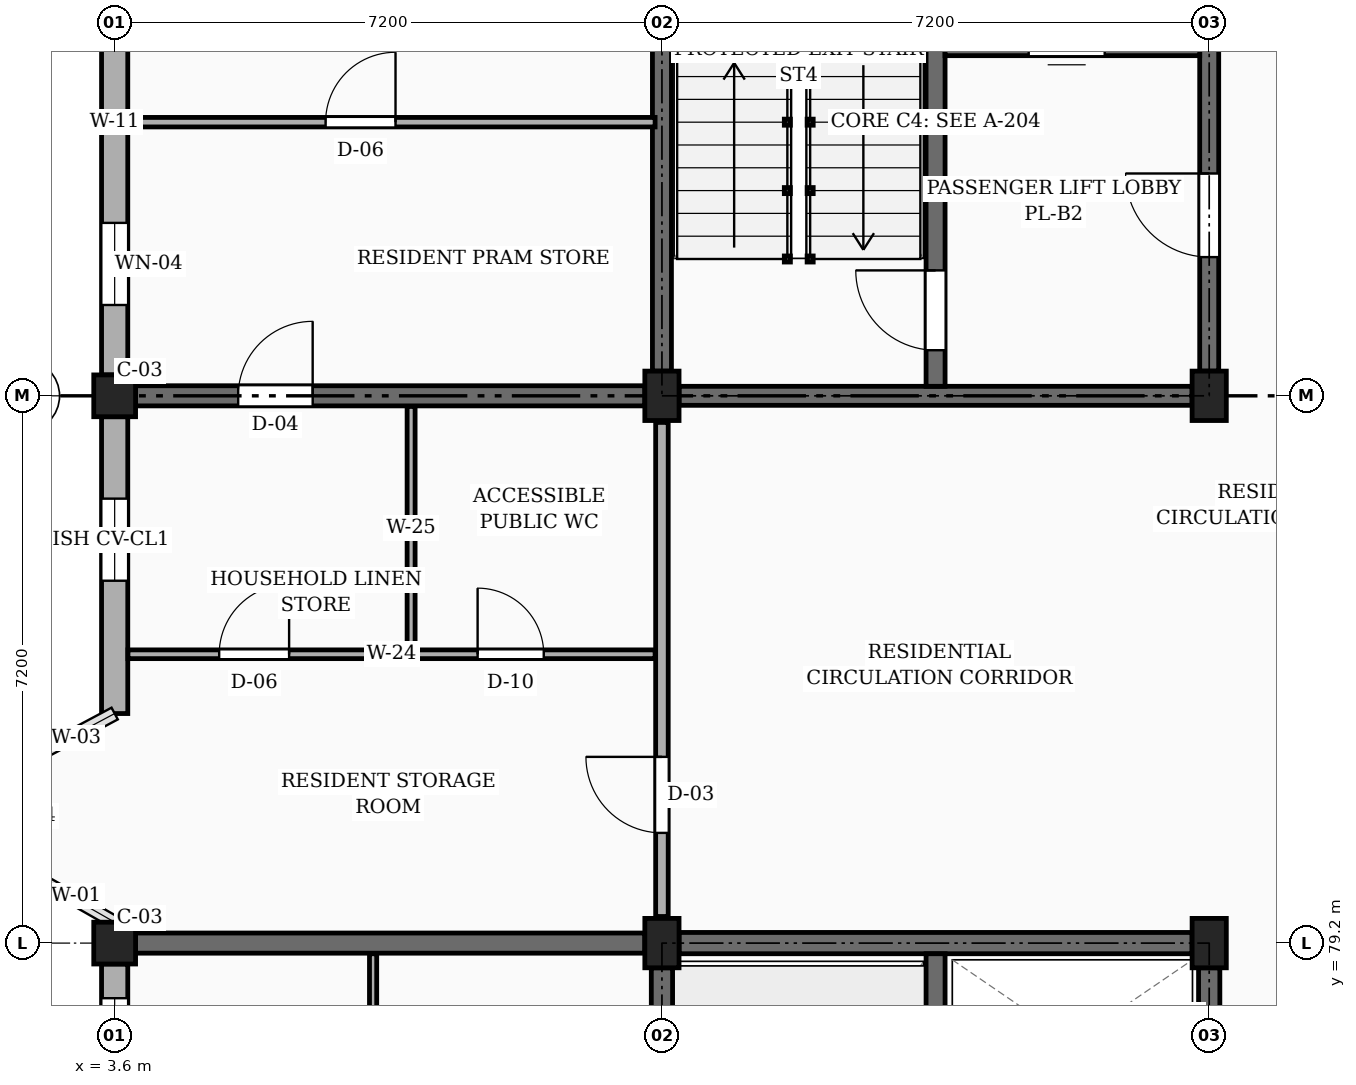
"""IFC4 building model, lengths in metres.
Left out: names, types, materials, properties, quantities, classifications, styles, units other than length and angle.
Written with IfcOpenShell. Run it as: python <this file> out.ifc"""

import sys

from ifc_helpers import new_model, si_unit, direction, frame, frame_2d, origin, origin_2d, place, context, subcontext, project, spatial, rectangle, extrude, element, fill, save


model = new_model("IFC4")
c1 = context("Model", 3, precision=1e-05, world=origin(), true_north=direction((0.0, 1.0)))
c2 = subcontext(c1, "Body", "Model", "MODEL_VIEW")
j1 = project(units=[si_unit("LENGTHUNIT", "METRE"), si_unit("PLANEANGLEUNIT", "RADIAN")], contexts=[c1])
p1 = place(None, origin())
s1 = spatial("IfcSite", under=j1, at=p1, CompositionType="ELEMENT")
p2 = place(p1, origin())
s2 = spatial("IfcBuilding", under=s1, at=p2, CompositionType="ELEMENT")
p3 = place(p2, frame((0.0, 0.0, 10.8)))
s3 = spatial("IfcBuildingStorey", under=s2, at=p3, CompositionType="ELEMENT", Elevation=10.8)
for number, where, z_axis, x_axis in (
    (1, (3.6, 79.2, 0.0), (0.0, 0.0, 1.0), (1.0, 0.0, 0.0)),
    (2, (3.6, 86.4, 0.0), (0.0, 0.0, 1.0), (1.0, 0.0, 0.0)),
):
    element("IfcColumn", number, at=place(p3, frame(where, z_axis=z_axis, x_axis=x_axis)), inside=s3, PredefinedType="COLUMN", context=c2, shape_type="SweptSolid", body=[
        extrude(rectangle(XDim=0.55, YDim=0.55, at=origin_2d()), origin(), (0.0, 0.0, 1.0), 3.15),
    ])
for number, where, z_axis, x_axis in (
    (3, (10.8, 79.2, 0.0), (0.0, 0.0, 1.0), (1.0, 0.0, 0.0)),
    (4, (10.8, 86.4, 0.0), (0.0, 0.0, 1.0), (1.0, 0.0, 0.0)),
    (5, (18.0, 79.2, 0.0), (0.0, 0.0, 1.0), (1.0, 0.0, 0.0)),
    (6, (18.0, 86.4, 0.0), (0.0, 0.0, 1.0), (1.0, 0.0, 0.0)),
):
    element("IfcColumn", number, at=place(p3, frame(where, z_axis=z_axis, x_axis=x_axis)), inside=s3, PredefinedType="COLUMN", context=c2, shape_type="SweptSolid", body=[
        extrude(rectangle(XDim=0.45, YDim=0.65, at=origin_2d()), origin(), (0.0, 0.0, 1.0), 3.15),
    ])
p4 = place(p3, frame((3.875, 79.2, 0.0), z_axis=(0.0, 0.0, 1.0), x_axis=(1.0, 0.0, 0.0)))
e7 = element("IfcWall", 7, at=p4, inside=s3, PredefinedType="SOLIDWALL", context=c2, shape_type="SweptSolid", body=[
    extrude(rectangle(XDim=6.7, YDim=0.265, at=frame_2d((3.35, 0.0))), origin(), (0.0, 0.0, 1.0), 2.21),
])
p5 = place(p3, frame((3.875, 86.4, 0.0), z_axis=(0.0, 0.0, 1.0), x_axis=(1.0, 0.0, 0.0)))
e8 = element("IfcWall", 8, at=p5, inside=s3, PredefinedType="SOLIDWALL", context=c2, shape_type="SweptSolid", body=[
    extrude(rectangle(XDim=6.7, YDim=0.265, at=frame_2d((3.35, 0.0))), origin(), (0.0, 0.0, 1.0), 2.21),
])
p6 = place(p5, frame((1.35, 0.0, 0.0)))
e9 = element("IfcOpeningElement", 9, at=p6, cuts=e8, PredefinedType="OPENING", context=c2, shape_type="SweptSolid", body=[
    extrude(rectangle(XDim=0.98, YDim=2.12, at=frame_2d((0.49, 1.06))), frame((0.0, 0.143, 0.0), z_axis=(0.0, -1.0, 0.0), x_axis=(1.0, 0.0, 0.0)), (0.0, 0.0, 1.0), 0.285),
])
p7 = place(p3, frame((3.6, 93.325, 0.0), z_axis=(0.0, 0.0, 1.0), x_axis=(0.0, -1.0, 0.0)))
e10 = element("IfcWall", 10, at=p7, inside=s3, PredefinedType="SOLIDWALL", context=c2, shape_type="SweptSolid", body=[
    extrude(rectangle(XDim=6.65, YDim=0.345, at=frame_2d((3.325, 0.0))), origin(), (0.0, 0.0, 1.0), 2.48),
])
p8 = place(p7, frame((0.45, 0.0, 0.78)))
e11 = element("IfcOpeningElement", 11, at=p8, cuts=e10, PredefinedType="OPENING", context=c2, shape_type="SweptSolid", body=[
    extrude(rectangle(XDim=0.92, YDim=1.15, at=frame_2d((0.46, 0.575))), frame((0.0, 0.183, 0.0), z_axis=(0.0, -1.0, 0.0), x_axis=(1.0, 0.0, 0.0)), (0.0, 0.0, 1.0), 0.365),
])
p9 = place(p7, frame((4.65, 0.0, 0.78)))
e12 = element("IfcOpeningElement", 12, at=p9, cuts=e10, PredefinedType="OPENING", context=c2, shape_type="SweptSolid", body=[
    extrude(rectangle(XDim=1.08, YDim=1.15, at=frame_2d((0.54, 0.575))), frame((0.0, 0.183, 0.0), z_axis=(0.0, -1.0, 0.0), x_axis=(1.0, 0.0, 0.0)), (0.0, 0.0, 1.0), 0.365),
])
p10 = place(p3, frame((3.6, 86.125, 0.0), z_axis=(0.0, 0.0, 1.0), x_axis=(0.0, -1.0, 0.0)))
e13 = element("IfcWall", 13, at=p10, inside=s3, PredefinedType="SOLIDWALL", context=c2, shape_type="SweptSolid", body=[
    extrude(rectangle(XDim=3.905, YDim=0.345, at=frame_2d((1.953, 0.0))), origin(), (0.0, 0.0, 1.0), 2.48),
])
p11 = place(p10, frame((1.077, 0.0, 0.78)))
e14 = element("IfcOpeningElement", 14, at=p11, cuts=e13, PredefinedType="OPENING", context=c2, shape_type="SweptSolid", body=[
    extrude(rectangle(XDim=1.08, YDim=1.15, at=frame_2d((0.54, 0.575))), frame((0.0, 0.183, 0.0), z_axis=(0.0, -1.0, 0.0), x_axis=(1.0, 0.0, 0.0)), (0.0, 0.0, 1.0), 0.365),
])
p12 = place(p3, frame((3.6, 78.925, 0.0), z_axis=(0.0, 0.0, 1.0), x_axis=(0.0, -1.0, 0.0)))
e15 = element("IfcWall", 15, at=p12, inside=s3, PredefinedType="SOLIDWALL", context=c2, shape_type="SweptSolid", body=[
    extrude(rectangle(XDim=6.65, YDim=0.345, at=frame_2d((3.325, 0.0))), origin(), (0.0, 0.0, 1.0), 2.48),
])
p13 = place(p12, frame((0.45, 0.0, 0.78)))
e16 = element("IfcOpeningElement", 16, at=p13, cuts=e15, PredefinedType="OPENING", context=c2, shape_type="SweptSolid", body=[
    extrude(rectangle(XDim=1.16, YDim=1.15, at=frame_2d((0.58, 0.575))), frame((0.0, 0.183, 0.0), z_axis=(0.0, -1.0, 0.0), x_axis=(1.0, 0.0, 0.0)), (0.0, 0.0, 1.0), 0.365),
])
p14 = place(p12, frame((4.65, 0.0, 0.78)))
e17 = element("IfcOpeningElement", 17, at=p14, cuts=e15, PredefinedType="OPENING", context=c2, shape_type="SweptSolid", body=[
    extrude(rectangle(XDim=1.32, YDim=1.15, at=frame_2d((0.66, 0.575))), frame((0.0, 0.183, 0.0), z_axis=(0.0, -1.0, 0.0), x_axis=(1.0, 0.0, 0.0)), (0.0, 0.0, 1.0), 0.365),
])
p15 = place(p3, frame((10.8, 72.325, 0.0), z_axis=(0.0, 0.0, 1.0), x_axis=(0.0, 1.0, 0.0)))
e18 = element("IfcWall", 18, at=p15, inside=s3, PredefinedType="SHEAR", context=c2, shape_type="SweptSolid", body=[
    extrude(rectangle(XDim=6.55, YDim=0.28, at=frame_2d((3.275, 0.0))), origin(), (0.0, 0.0, 1.0), 2.91),
])
p16 = place(p3, frame((11.025, 79.2, 0.0), z_axis=(0.0, 0.0, 1.0), x_axis=(1.0, 0.0, 0.0)))
e19 = element("IfcWall", 19, at=p16, inside=s3, PredefinedType="SHEAR", context=c2, shape_type="SweptSolid", body=[
    extrude(rectangle(XDim=6.75, YDim=0.28, at=frame_2d((3.375, 0.0))), origin(), (0.0, 0.0, 1.0), 2.91),
])
p17 = place(p3, frame((18.0, 72.325, 0.0), z_axis=(0.0, 0.0, 1.0), x_axis=(0.0, 1.0, 0.0)))
e20 = element("IfcWall", 20, at=p17, inside=s3, PredefinedType="SHEAR", context=c2, shape_type="SweptSolid", body=[
    extrude(rectangle(XDim=6.55, YDim=0.28, at=frame_2d((3.275, 0.0))), origin(), (0.0, 0.0, 1.0), 2.91),
])
p18 = place(p17, frame((1.5, 0.0, 0.0)))
e21 = element("IfcOpeningElement", 21, at=p18, cuts=e20, PredefinedType="OPENING", context=c2, shape_type="SweptSolid", body=[
    extrude(rectangle(XDim=1.1, YDim=2.15, at=frame_2d((0.55, 1.075))), frame((0.0, 0.15, 0.0), z_axis=(0.0, -1.0, 0.0), x_axis=(1.0, 0.0, 0.0)), (0.0, 0.0, 1.0), 0.3),
])
p19 = place(p3, frame((14.4, 72.14, 0.0), z_axis=(0.0, 0.0, 1.0), x_axis=(0.0, 1.0, 0.0)))
e22 = element("IfcWall", 22, at=p19, inside=s3, PredefinedType="SHEAR", context=c2, shape_type="SweptSolid", body=[
    extrude(rectangle(XDim=6.92, YDim=0.25, at=frame_2d((3.46, 0.0))), origin(), (0.0, 0.0, 1.0), 2.91),
])
p20 = place(p19, frame((0.46, 0.0, 0.0)))
e23 = element("IfcOpeningElement", 23, at=p20, cuts=e22, PredefinedType="OPENING", context=c2, shape_type="SweptSolid", body=[
    extrude(rectangle(XDim=1.05, YDim=2.15, at=frame_2d((0.525, 1.075))), frame((0.0, 0.135, 0.0), z_axis=(0.0, -1.0, 0.0), x_axis=(1.0, 0.0, 0.0)), (0.0, 0.0, 1.0), 0.27),
])
p21 = place(p3, frame((10.8, 86.725, 0.0), z_axis=(0.0, 0.0, 1.0), x_axis=(0.0, 1.0, 0.0)))
e24 = element("IfcWall", 24, at=p21, inside=s3, PredefinedType="SHEAR", context=c2, shape_type="SweptSolid", body=[
    extrude(rectangle(XDim=6.55, YDim=0.25, at=frame_2d((3.275, 0.0))), origin(), (0.0, 0.0, 1.0), 2.91),
])
p22 = place(p3, frame((18.0, 86.725, 0.0), z_axis=(0.0, 0.0, 1.0), x_axis=(0.0, 1.0, 0.0)))
e25 = element("IfcWall", 25, at=p22, inside=s3, PredefinedType="SHEAR", context=c2, shape_type="SweptSolid", body=[
    extrude(rectangle(XDim=6.55, YDim=0.25, at=frame_2d((3.275, 0.0))), origin(), (0.0, 0.0, 1.0), 2.91),
])
p23 = place(p22, frame((1.5, 0.0, 0.0)))
e26 = element("IfcOpeningElement", 26, at=p23, cuts=e25, PredefinedType="OPENING", context=c2, shape_type="SweptSolid", body=[
    extrude(rectangle(XDim=1.1, YDim=2.15, at=frame_2d((0.55, 1.075))), frame((0.0, 0.135, 0.0), z_axis=(0.0, -1.0, 0.0), x_axis=(1.0, 0.0, 0.0)), (0.0, 0.0, 1.0), 0.27),
])
p24 = place(p3, frame((11.025, 86.4, 0.0), z_axis=(0.0, 0.0, 1.0), x_axis=(1.0, 0.0, 0.0)))
e27 = element("IfcWall", 27, at=p24, inside=s3, PredefinedType="SHEAR", context=c2, shape_type="SweptSolid", body=[
    extrude(rectangle(XDim=6.75, YDim=0.25, at=frame_2d((3.375, 0.0))), origin(), (0.0, 0.0, 1.0), 2.91),
])
p25 = place(p3, frame((14.4, 86.525, 0.0), z_axis=(0.0, 0.0, 1.0), x_axis=(0.0, 1.0, 0.0)))
e28 = element("IfcWall", 28, at=p25, inside=s3, PredefinedType="SHEAR", context=c2, shape_type="SweptSolid", body=[
    extrude(rectangle(XDim=6.95, YDim=0.25, at=frame_2d((3.475, 0.0))), origin(), (0.0, 0.0, 1.0), 2.91),
])
p26 = place(p25, frame((0.475, 0.0, 0.0)))
e29 = element("IfcOpeningElement", 29, at=p26, cuts=e28, PredefinedType="OPENING", context=c2, shape_type="SweptSolid", body=[
    extrude(rectangle(XDim=1.05, YDim=2.15, at=frame_2d((0.525, 1.075))), frame((0.0, 0.135, 0.0), z_axis=(0.0, -1.0, 0.0), x_axis=(1.0, 0.0, 0.0)), (0.0, 0.0, 1.0), 0.27),
])
p27 = place(p3, frame((14.525, 91.0, 0.0), z_axis=(0.0, 0.0, 1.0), x_axis=(1.0, 0.0, 0.0)))
e30 = element("IfcWall", 30, at=p27, inside=s3, PredefinedType="SHEAR", context=c2, shape_type="SweptSolid", body=[
    extrude(rectangle(XDim=3.35, YDim=0.25, at=frame_2d((1.675, 0.0))), origin(), (0.0, 0.0, 1.0), 2.91),
])
p28 = place(p27, frame((1.1, 0.0, 0.0)))
e31 = element("IfcOpeningElement", 31, at=p28, cuts=e30, PredefinedType="OPENING", context=c2, shape_type="SweptSolid", body=[
    extrude(rectangle(XDim=1.0, YDim=2.2, at=frame_2d((0.5, 1.1))), frame((0.0, 0.135, 0.0), z_axis=(0.0, -1.0, 0.0), x_axis=(1.0, 0.0, 0.0)), (0.0, 0.0, 1.0), 0.27),
])
p29 = place(p3, frame((10.8, 79.55, 0.0), z_axis=(0.0, 0.0, 1.0), x_axis=(0.0, 1.0, 0.0)))
e32 = element("IfcWall", 32, at=p29, inside=s3, PredefinedType="PARTITIONING", context=c2, shape_type="SweptSolid", body=[
    extrude(rectangle(XDim=6.5, YDim=0.165, at=frame_2d((3.25, 0.0))), origin(), (0.0, 0.0, 1.0), 2.26),
])
p30 = place(p29, frame((1.1, 0.0, 0.0)))
e33 = element("IfcOpeningElement", 33, at=p30, cuts=e32, PredefinedType="OPENING", context=c2, shape_type="SweptSolid", body=[
    extrude(rectangle(XDim=1.0, YDim=2.15, at=frame_2d((0.5, 1.075))), frame((0.0, 0.093, 0.0), z_axis=(0.0, -1.0, 0.0), x_axis=(1.0, 0.0, 0.0)), (0.0, 0.0, 1.0), 0.185),
])
p31 = place(p3, frame((7.0, 75.37, 0.0), z_axis=(0.0, 0.0, 1.0), x_axis=(0.0, 1.0, 0.0)))
e34 = element("IfcWall", 34, at=p31, inside=s3, PredefinedType="PARTITIONING", context=c2, shape_type="SweptSolid", body=[
    extrude(rectangle(XDim=3.69, YDim=0.095, at=frame_2d((1.845, 0.0))), origin(), (0.0, 0.0, 1.0), 2.345),
])
p32 = place(p3, frame((3.775, 83.0, 0.0), z_axis=(0.0, 0.0, 1.0), x_axis=(1.0, 0.0, 0.0)))
e35 = element("IfcWall", 35, at=p32, inside=s3, PredefinedType="PARTITIONING", context=c2, shape_type="SweptSolid", body=[
    extrude(rectangle(XDim=6.935, YDim=0.115, at=frame_2d((3.468, 0.0))), origin(), (0.0, 0.0, 1.0), 2.345),
])
p33 = place(p32, frame((4.6, 0.0, 0.0)))
e36 = element("IfcOpeningElement", 36, at=p33, cuts=e35, PredefinedType="OPENING", context=c2, shape_type="SweptSolid", body=[
    extrude(rectangle(XDim=0.87, YDim=2.05, at=frame_2d((0.435, 1.025))), frame((0.0, 0.067, 0.0), z_axis=(0.0, -1.0, 0.0), x_axis=(1.0, 0.0, 0.0)), (0.0, 0.0, 1.0), 0.135),
])
p34 = place(p32, frame((1.2, 0.0, 0.0)))
e37 = element("IfcOpeningElement", 37, at=p34, cuts=e35, PredefinedType="OPENING", context=c2, shape_type="SweptSolid", body=[
    extrude(rectangle(XDim=0.92, YDim=2.1, at=frame_2d((0.46, 1.05))), frame((0.0, 0.067, 0.0), z_axis=(0.0, -1.0, 0.0), x_axis=(1.0, 0.0, 0.0)), (0.0, 0.0, 1.0), 0.135),
])
p35 = place(p3, frame((7.5, 83.07, 0.0), z_axis=(0.0, 0.0, 1.0), x_axis=(0.0, 1.0, 0.0)))
e38 = element("IfcWall", 38, at=p35, inside=s3, PredefinedType="PARTITIONING", context=c2, shape_type="SweptSolid", body=[
    extrude(rectangle(XDim=3.19, YDim=0.105, at=frame_2d((1.595, 0.0))), origin(), (0.0, 0.0, 1.0), 2.345),
])
p36 = place(p3, frame((3.775, 90.0, 0.0), z_axis=(0.0, 0.0, 1.0), x_axis=(1.0, 0.0, 0.0)))
e39 = element("IfcWall", 39, at=p36, inside=s3, PredefinedType="PARTITIONING", context=c2, shape_type="SweptSolid", body=[
    extrude(rectangle(XDim=6.935, YDim=0.125, at=frame_2d((3.468, 0.0))), origin(), (0.0, 0.0, 1.0), 2.345),
])
p37 = place(p36, frame((2.6, 0.0, 0.0)))
e40 = element("IfcOpeningElement", 40, at=p37, cuts=e39, PredefinedType="OPENING", context=c2, shape_type="SweptSolid", body=[
    extrude(rectangle(XDim=0.92, YDim=2.1, at=frame_2d((0.46, 1.05))), frame((0.0, 0.073, 0.0), z_axis=(0.0, -1.0, 0.0), x_axis=(1.0, 0.0, 0.0)), (0.0, 0.0, 1.0), 0.145),
])
p38 = place(p9, origin())
e41 = element("IfcWindow", 41, at=p38, inside=s3, PartitioningType="SINGLE_PANEL", PredefinedType="WINDOW", context=c2, shape_type="SweptSolid", body=[
    extrude(rectangle(XDim=1.08, YDim=1.15, at=frame_2d((0.54, 0.575))), frame((0.0, 0.03, 0.0), z_axis=(0.0, -1.0, 0.0), x_axis=(1.0, 0.0, 0.0)), (0.0, 0.0, 1.0), 0.06),
])
fill(e12, e41)
p39 = place(p11, origin())
e42 = element("IfcWindow", 42, at=p39, inside=s3, PartitioningType="SINGLE_PANEL", PredefinedType="WINDOW", context=c2, shape_type="SweptSolid", body=[
    extrude(rectangle(XDim=1.08, YDim=1.15, at=frame_2d((0.54, 0.575))), frame((0.0, 0.03, 0.0), z_axis=(0.0, -1.0, 0.0), x_axis=(1.0, 0.0, 0.0)), (0.0, 0.0, 1.0), 0.06),
])
fill(e14, e42)
p40 = place(p13, origin())
e43 = element("IfcWindow", 43, at=p40, inside=s3, PartitioningType="SINGLE_PANEL", PredefinedType="WINDOW", context=c2, shape_type="SweptSolid", body=[
    extrude(rectangle(XDim=1.16, YDim=1.15, at=frame_2d((0.58, 0.575))), frame((0.0, 0.03, 0.0), z_axis=(0.0, -1.0, 0.0), x_axis=(1.0, 0.0, 0.0)), (0.0, 0.0, 1.0), 0.06),
])
fill(e16, e43)
p41 = place(p23, frame((1.1, 0.0, 0.0), z_axis=(0.0, 0.0, 1.0), x_axis=(-1.0, 0.0, 0.0)))
e44 = element("IfcDoor", 44, at=p41, inside=s3, OperationType="SINGLE_SWING_RIGHT", PredefinedType="DOOR", context=c2, shape_type="SweptSolid", body=[
    extrude(rectangle(XDim=1.1, YDim=2.15, at=frame_2d((0.55, 1.075))), frame((0.0, 0.025, 0.0), z_axis=(0.0, -1.0, 0.0), x_axis=(1.0, 0.0, 0.0)), (0.0, 0.0, 1.0), 0.05),
])
fill(e26, e44)
p42 = place(p26, origin())
e45 = element("IfcDoor", 45, at=p42, inside=s3, OperationType="SINGLE_SWING_RIGHT", PredefinedType="DOOR", context=c2, shape_type="SweptSolid", body=[
    extrude(rectangle(XDim=1.05, YDim=2.15, at=frame_2d((0.525, 1.075))), frame((0.0, 0.025, 0.0), z_axis=(0.0, -1.0, 0.0), x_axis=(1.0, 0.0, 0.0)), (0.0, 0.0, 1.0), 0.05),
])
fill(e29, e45)
p43 = place(p30, origin())
e46 = element("IfcDoor", 46, at=p43, inside=s3, OperationType="SINGLE_SWING_RIGHT", PredefinedType="DOOR", context=c2, shape_type="SweptSolid", body=[
    extrude(rectangle(XDim=1.0, YDim=2.15, at=frame_2d((0.5, 1.075))), frame((0.0, 0.025, 0.0), z_axis=(0.0, -1.0, 0.0), x_axis=(1.0, 0.0, 0.0)), (0.0, 0.0, 1.0), 0.05),
])
fill(e33, e46)
p44 = place(p33, origin())
e47 = element("IfcDoor", 47, at=p44, inside=s3, OperationType="SINGLE_SWING_LEFT", PredefinedType="DOOR", context=c2, shape_type="SweptSolid", body=[
    extrude(rectangle(XDim=0.87, YDim=2.05, at=frame_2d((0.435, 1.025))), frame((0.0, 0.025, 0.0), z_axis=(0.0, -1.0, 0.0), x_axis=(1.0, 0.0, 0.0)), (0.0, 0.0, 1.0), 0.05),
])
fill(e36, e47)
p45 = place(p34, origin())
e48 = element("IfcDoor", 48, at=p45, inside=s3, OperationType="SINGLE_SWING_RIGHT", PredefinedType="DOOR", context=c2, shape_type="SweptSolid", body=[
    extrude(rectangle(XDim=0.92, YDim=2.1, at=frame_2d((0.46, 1.05))), frame((0.0, 0.025, 0.0), z_axis=(0.0, -1.0, 0.0), x_axis=(1.0, 0.0, 0.0)), (0.0, 0.0, 1.0), 0.05),
])
fill(e37, e48)
p46 = place(p37, origin())
e49 = element("IfcDoor", 49, at=p46, inside=s3, OperationType="SINGLE_SWING_RIGHT", PredefinedType="DOOR", context=c2, shape_type="SweptSolid", body=[
    extrude(rectangle(XDim=0.92, YDim=2.1, at=frame_2d((0.46, 1.05))), frame((0.0, 0.025, 0.0), z_axis=(0.0, -1.0, 0.0), x_axis=(1.0, 0.0, 0.0)), (0.0, 0.0, 1.0), 0.05),
])
fill(e40, e49)
p47 = place(p6, origin())
e50 = element("IfcDoor", 50, at=p47, inside=s3, OperationType="SINGLE_SWING_RIGHT", PredefinedType="DOOR", context=c2, shape_type="SweptSolid", body=[
    extrude(rectangle(XDim=0.98, YDim=2.12, at=frame_2d((0.49, 1.06))), frame((0.0, 0.025, 0.0), z_axis=(0.0, -1.0, 0.0), x_axis=(1.0, 0.0, 0.0)), (0.0, 0.0, 1.0), 0.05),
])
fill(e9, e50)
save(model, sys.argv[1])
